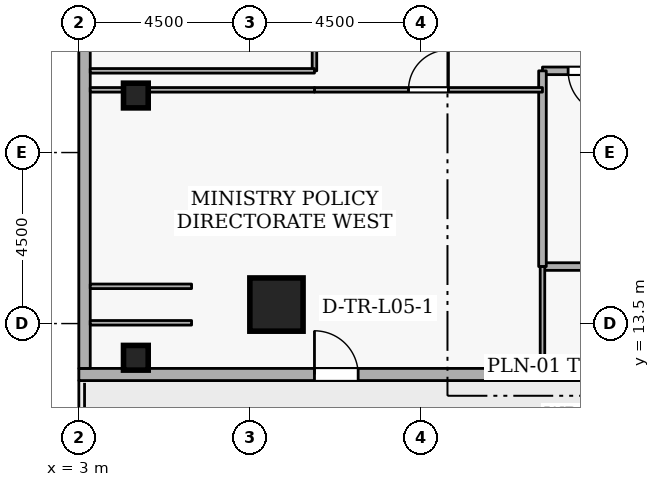
"""IFC4 building model, lengths in metres.
Left out: names, types, materials, properties, quantities, classifications, styles, units other than length and angle.
Written with IfcOpenShell. Run it as: python <this file> out.ifc"""

import sys

from ifc_helpers import new_model, si_unit, direction, frame, frame_2d, origin, origin_2d, place, context, subcontext, project, spatial, rectangle, extrude, element, fill, save


model = new_model("IFC4")
c1 = context("Model", 3, precision=1e-05, world=origin(), true_north=direction((0.0, 1.0)))
c2 = subcontext(c1, "Body", "Model", "MODEL_VIEW")
j1 = project(units=[si_unit("LENGTHUNIT", "METRE"), si_unit("PLANEANGLEUNIT", "RADIAN")], contexts=[c1])
p1 = place(None, origin())
s1 = spatial("IfcSite", under=j1, at=p1, CompositionType="ELEMENT")
p2 = place(p1, origin())
s2 = spatial("IfcBuilding", under=s1, at=p2, CompositionType="ELEMENT")
p3 = place(p2, frame((0.0, 0.0, 23.1)))
s3 = spatial("IfcBuildingStorey", under=s2, at=p3, CompositionType="ELEMENT", Elevation=23.1)
p4 = place(p3, frame((8.2, 14.0, 0.0), z_axis=(0.0, 0.0, 1.0), x_axis=(1.0, 0.0, 0.0)))
e1 = element("IfcColumn", 1, at=p4, inside=s3, PredefinedType="COLUMN", context=c2, shape_type="SweptSolid", body=[
    extrude(rectangle(XDim=1.4, YDim=1.4, at=origin_2d()), origin(), (0.0, 0.0, 1.0), 4.8),
])
for number, where, z_axis, x_axis in (
    (2, (4.5, 12.6, 0.0), (0.0, 0.0, 1.0), (1.0, 0.0, 0.0)),
    (3, (4.5, 19.5, 0.0), (0.0, 0.0, 1.0), (1.0, 0.0, 0.0)),
):
    element("IfcColumn", number, at=place(p3, frame(where, z_axis=z_axis, x_axis=x_axis)), inside=s3, PredefinedType="COLUMN", context=c2, shape_type="SweptSolid", body=[
        extrude(rectangle(XDim=0.65, YDim=0.65, at=origin_2d()), origin(), (0.0, 0.0, 1.0), 4.8),
    ])
p5 = place(p3, frame((3.0, 12.16, 0.0), z_axis=(0.0, 0.0, 1.0), x_axis=(1.0, 0.0, 0.0)))
e4 = element("IfcWall", 4, at=p5, inside=s3, PredefinedType="STANDARD", context=c2, shape_type="SweptSolid", body=[
    extrude(rectangle(XDim=39.4, YDim=0.32, at=frame_2d((19.7, 0.0))), origin(), (0.0, 0.0, 1.0), 2.84),
])
p6 = place(p5, frame((6.2, 0.0, 0.0)))
e5 = element("IfcOpeningElement", 5, at=p6, cuts=e4, PredefinedType="OPENING", context=c2, shape_type="SweptSolid", body=[
    extrude(rectangle(XDim=1.15, YDim=2.1, at=frame_2d((0.575, 1.05))), frame((0.0, 0.17, 0.0), z_axis=(0.0, -1.0, 0.0), x_axis=(1.0, 0.0, 0.0)), (0.0, 0.0, 1.0), 0.34),
])
p7 = place(p5, frame((12.8, 0.0, 0.65)))
e6 = element("IfcOpeningElement", 6, at=p7, cuts=e4, PredefinedType="OPENING", context=c2, shape_type="SweptSolid", body=[
    extrude(rectangle(XDim=1.8, YDim=1.25, at=frame_2d((0.9, 0.625))), frame((0.0, 0.17, 0.0), z_axis=(0.0, -1.0, 0.0), x_axis=(1.0, 0.0, 0.0)), (0.0, 0.0, 1.0), 0.34),
])
p8 = place(p5, frame((32.8, 0.0, 0.65)))
e7 = element("IfcOpeningElement", 7, at=p8, cuts=e4, PredefinedType="OPENING", context=c2, shape_type="SweptSolid", body=[
    extrude(rectangle(XDim=1.8, YDim=1.25, at=frame_2d((0.9, 0.625))), frame((0.0, 0.17, 0.0), z_axis=(0.0, -1.0, 0.0), x_axis=(1.0, 0.0, 0.0)), (0.0, 0.0, 1.0), 0.34),
])
p9 = place(p3, frame((3.15, 49.18, 0.0), z_axis=(0.0, 0.0, 1.0), x_axis=(0.0, -1.0, 0.0)))
e8 = element("IfcWall", 8, at=p9, inside=s3, PredefinedType="STANDARD", context=c2, shape_type="SweptSolid", body=[
    extrude(rectangle(XDim=36.86, YDim=0.3, at=frame_2d((18.43, 0.0))), origin(), (0.0, 0.0, 1.0), 2.84),
])
p10 = place(p3, frame((15.2, 15.0, 0.0), z_axis=(0.0, 0.0, 1.0), x_axis=(1.0, 0.0, 0.0)))
e9 = element("IfcWall", 9, at=p10, inside=s3, PredefinedType="STANDARD", context=c2, shape_type="SweptSolid", body=[
    extrude(rectangle(XDim=2.5, YDim=0.2, at=frame_2d((1.25, 0.0))), origin(), (0.0, 0.0, 1.0), 4.54),
])
p11 = place(p3, frame((17.7, 20.15, 0.0), z_axis=(0.0, 0.0, 1.0), x_axis=(-1.0, 0.0, 0.0)))
e10 = element("IfcWall", 10, at=p11, inside=s3, PredefinedType="STANDARD", context=c2, shape_type="SweptSolid", body=[
    extrude(rectangle(XDim=2.5, YDim=0.2, at=frame_2d((1.25, 0.0))), origin(), (0.0, 0.0, 1.0), 4.54),
])
p12 = place(p11, frame((0.675, 0.0, 0.0)))
e11 = element("IfcOpeningElement", 11, at=p12, cuts=e10, PredefinedType="OPENING", context=c2, shape_type="SweptSolid", body=[
    extrude(rectangle(XDim=1.15, YDim=2.1, at=frame_2d((0.575, 1.05))), frame((0.0, 0.11, 0.0), z_axis=(0.0, -1.0, 0.0), x_axis=(1.0, 0.0, 0.0)), (0.0, 0.0, 1.0), 0.22),
])
p13 = place(p3, frame((15.2, 20.15, 0.0), z_axis=(0.0, 0.0, 1.0), x_axis=(0.0, -1.0, 0.0)))
e12 = element("IfcWall", 12, at=p13, inside=s3, PredefinedType="STANDARD", context=c2, shape_type="SweptSolid", body=[
    extrude(rectangle(XDim=5.15, YDim=0.2, at=frame_2d((2.575, 0.0))), origin(), (0.0, 0.0, 1.0), 4.54),
])
p14 = place(p3, frame((9.2, 19.65, 0.0), z_axis=(0.0, 0.0, 1.0), x_axis=(1.0, 0.0, 0.0)))
e13 = element("IfcWall", 13, at=p14, inside=s3, PredefinedType="PARTITIONING", context=c2, shape_type="SweptSolid", body=[
    extrude(rectangle(XDim=6.0, YDim=0.12, at=frame_2d((3.0, 0.0))), origin(), (0.0, 0.0, 1.0), 4.54),
])
p15 = place(p14, frame((2.475, 0.0, 0.0)))
e14 = element("IfcOpeningElement", 14, at=p15, cuts=e13, PredefinedType="OPENING", context=c2, shape_type="SweptSolid", body=[
    extrude(rectangle(XDim=1.05, YDim=2.1, at=frame_2d((0.525, 1.05))), frame((0.0, 0.07, 0.0), z_axis=(0.0, -1.0, 0.0), x_axis=(1.0, 0.0, 0.0)), (0.0, 0.0, 1.0), 0.14),
])
p16 = place(p3, frame((15.2, 15.0, 0.0), z_axis=(0.0, 0.0, 1.0), x_axis=(0.0, -1.0, 0.0)))
e15 = element("IfcWall", 15, at=p16, inside=s3, PredefinedType="PARTITIONING", context=c2, shape_type="SweptSolid", body=[
    extrude(rectangle(XDim=2.68, YDim=0.12, at=frame_2d((1.34, 0.0))), origin(), (0.0, 0.0, 1.0), 4.54),
])
for number, where, z_axis, x_axis in (
    (16, (3.3, 13.52, 0.0), (0.0, 0.0, 1.0), (1.0, 0.0, 0.0)),
    (17, (5.966, 14.48, 0.0), (0.0, 0.0, 1.0), (-1.0, 0.0, 0.0)),
):
    element("IfcWall", number, at=place(p3, frame(where, z_axis=z_axis, x_axis=x_axis)), inside=s3, PredefinedType="PARTITIONING", context=c2, shape_type="SweptSolid", body=[
        extrude(rectangle(XDim=2.666, YDim=0.12, at=frame_2d((1.333, 0.0))), origin(), (0.0, 0.0, 1.0), 2.885),
    ])
p17 = place(p3, frame((3.3, 19.65, 0.0), z_axis=(0.0, 0.0, 1.0), x_axis=(1.0, 0.0, 0.0)))
e18 = element("IfcWall", 18, at=p17, inside=s3, PredefinedType="PARTITIONING", context=c2, shape_type="SweptSolid", body=[
    extrude(rectangle(XDim=5.9, YDim=0.12, at=frame_2d((2.95, 0.0))), origin(), (0.0, 0.0, 1.0), 4.54),
])
p18 = place(p3, frame((9.2, 21.4, 0.0), z_axis=(0.0, 0.0, 1.0), x_axis=(0.0, -1.0, 0.0)))
e19 = element("IfcWall", 19, at=p18, inside=s3, PredefinedType="PARTITIONING", context=c2, shape_type="SweptSolid", body=[
    extrude(rectangle(XDim=1.25, YDim=0.12, at=frame_2d((0.625, 0.0))), origin(), (0.0, 0.0, 1.0), 4.54),
])
p19 = place(p3, frame((9.2, 20.15, 0.0), z_axis=(0.0, 0.0, 1.0), x_axis=(-1.0, 0.0, 0.0)))
e20 = element("IfcWall", 20, at=p19, inside=s3, PredefinedType="PARTITIONING", context=c2, shape_type="SweptSolid", body=[
    extrude(rectangle(XDim=5.9, YDim=0.12, at=frame_2d((2.95, 0.0))), origin(), (0.0, 0.0, 1.0), 4.54),
])
p20 = place(p6, origin())
e21 = element("IfcDoor", 21, at=p20, inside=s3, OperationType="SINGLE_SWING_LEFT", PredefinedType="DOOR", context=c2, shape_type="SweptSolid", body=[
    extrude(rectangle(XDim=1.15, YDim=2.1, at=frame_2d((0.575, 1.05))), frame((0.0, 0.025, 0.0), z_axis=(0.0, -1.0, 0.0), x_axis=(1.0, 0.0, 0.0)), (0.0, 0.0, 1.0), 0.05),
])
fill(e5, e21)
p21 = place(p7, origin())
e22 = element("IfcWindow", 22, at=p21, inside=s3, PartitioningType="SINGLE_PANEL", PredefinedType="WINDOW", context=c2, shape_type="SweptSolid", body=[
    extrude(rectangle(XDim=1.8, YDim=1.25, at=frame_2d((0.9, 0.625))), frame((0.0, 0.03, 0.0), z_axis=(0.0, -1.0, 0.0), x_axis=(1.0, 0.0, 0.0)), (0.0, 0.0, 1.0), 0.06),
])
fill(e6, e22)
p22 = place(p12, origin())
e23 = element("IfcDoor", 23, at=p22, inside=s3, OperationType="SINGLE_SWING_LEFT", PredefinedType="DOOR", context=c2, shape_type="SweptSolid", body=[
    extrude(rectangle(XDim=1.15, YDim=2.1, at=frame_2d((0.575, 1.05))), frame((0.0, 0.025, 0.0), z_axis=(0.0, -1.0, 0.0), x_axis=(1.0, 0.0, 0.0)), (0.0, 0.0, 1.0), 0.05),
])
fill(e11, e23)
p23 = place(p15, origin())
e24 = element("IfcDoor", 24, at=p23, inside=s3, OperationType="SINGLE_SWING_RIGHT", PredefinedType="DOOR", context=c2, shape_type="SweptSolid", body=[
    extrude(rectangle(XDim=1.05, YDim=2.1, at=frame_2d((0.525, 1.05))), frame((0.0, 0.025, 0.0), z_axis=(0.0, -1.0, 0.0), x_axis=(1.0, 0.0, 0.0)), (0.0, 0.0, 1.0), 0.05),
])
fill(e14, e24)
save(model, sys.argv[1])
